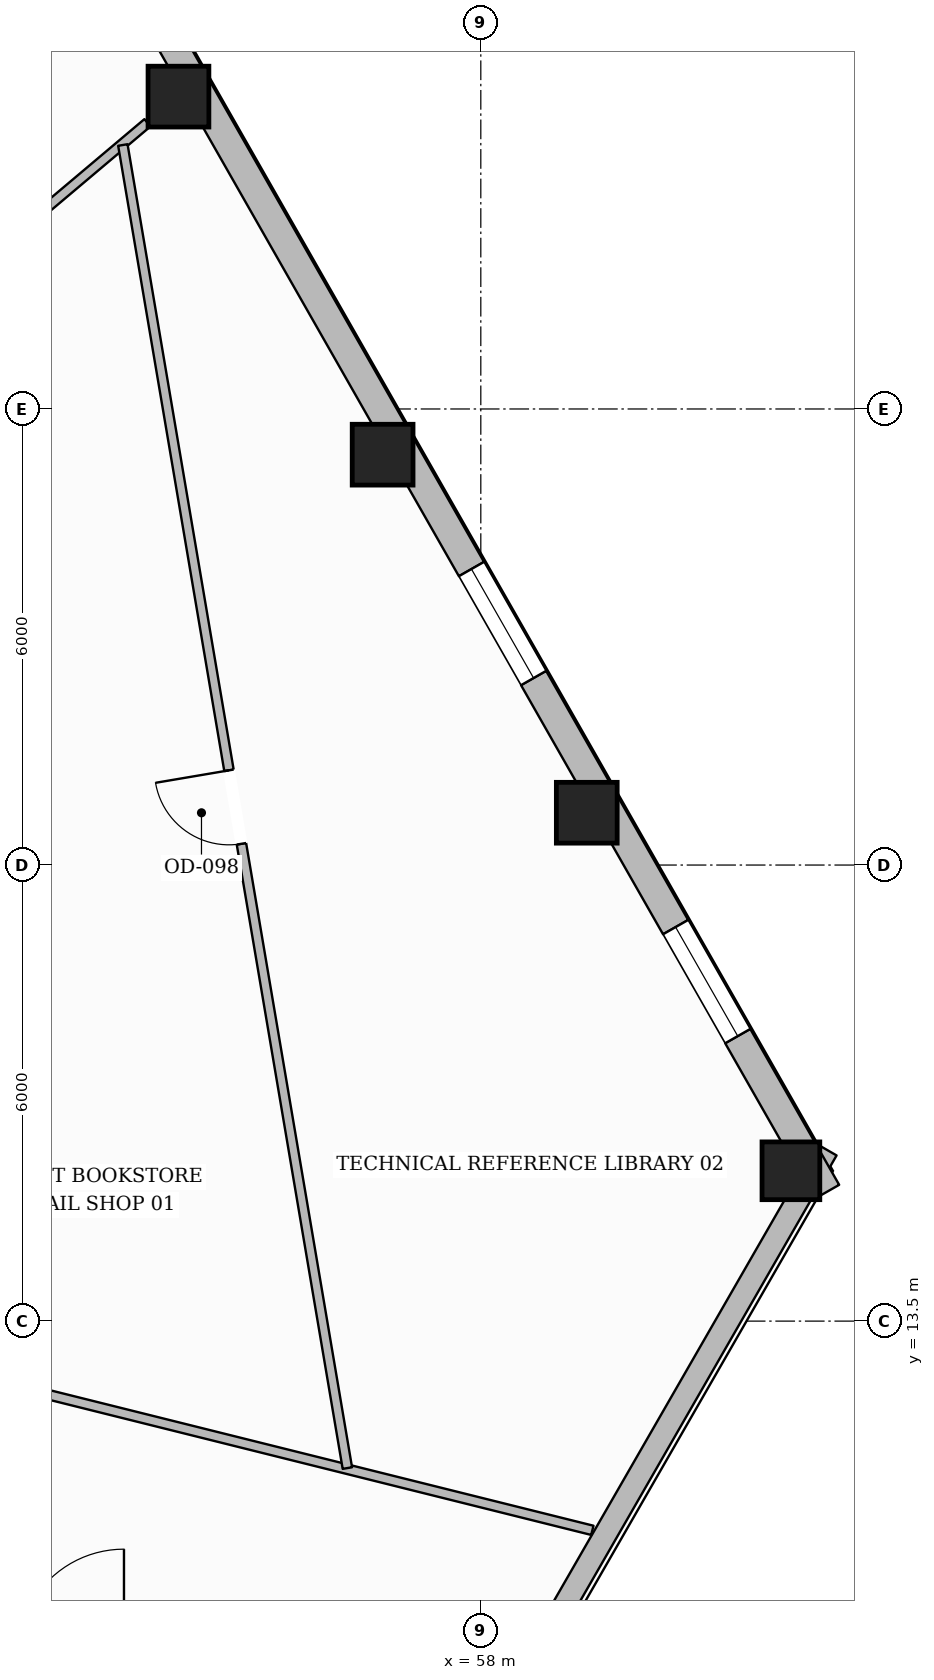
"""IFC4 building model, lengths in metres.
Left out: names, types, materials, properties, quantities, classifications, styles, units other than length and angle.
Written with IfcOpenShell. Run it as: python <this file> out.ifc"""

import sys

from ifc_helpers import new_model, si_unit, direction, frame, frame_2d, origin, origin_2d, place, context, subcontext, project, spatial, rectangle, hollow_rectangle, extrude, element, fill, save


model = new_model("IFC4")
c1 = context("Model", 3, precision=1e-05, world=origin(), true_north=direction((0.0, 1.0)))
c2 = subcontext(c1, "Body", "Model", "MODEL_VIEW")
j1 = project(units=[si_unit("LENGTHUNIT", "METRE"), si_unit("PLANEANGLEUNIT", "RADIAN")], contexts=[c1])
p1 = place(None, origin())
s1 = spatial("IfcSite", under=j1, at=p1, CompositionType="ELEMENT")
p2 = place(p1, origin())
s2 = spatial("IfcBuilding", under=s1, at=p2, CompositionType="ELEMENT")
p3 = place(p2, frame((0.0, 0.0, 13.7)))
s3 = spatial("IfcBuildingStorey", under=s2, at=p3, CompositionType="ELEMENT", Elevation=13.7)
p4 = place(p3, frame((62.08, 15.478, 0.0), z_axis=(0.0, 0.0, 1.0), x_axis=(1.0, 0.0, 0.0)))
e1 = element("IfcColumn", 1, at=p4, inside=s3, PredefinedType="COLUMN", context=c2, shape_type="SweptSolid", body=[
    extrude(hollow_rectangle(XDim=0.76, YDim=0.76, WallThickness=0.035, at=origin_2d()), origin(), (0.0, 0.0, 1.0), 3.59),
])
for number, where, z_axis, x_axis in (
    (2, (59.394, 20.188, 0.0), (0.0, 0.0, 1.0), (1.0, 0.0, 0.0)),
    (3, (56.708, 24.899, 0.0), (0.0, 0.0, 1.0), (1.0, 0.0, 0.0)),
    (4, (54.022, 29.609, 0.0), (0.0, 0.0, 1.0), (1.0, 0.0, 0.0)),
):
    element("IfcColumn", number, at=place(p3, frame(where, z_axis=z_axis, x_axis=x_axis)), inside=s3, PredefinedType="COLUMN", context=c2, shape_type="SweptSolid", body=[
        extrude(hollow_rectangle(XDim=0.8, YDim=0.8, WallThickness=0.036, at=origin_2d()), origin(), (0.0, 0.0, 1.0), 3.59),
    ])
p5 = place(p3, frame((62.551, 15.755, 0.0), z_axis=(0.0, 0.0, 1.0), x_axis=(-0.498758778038, -0.866740838619, 0.0)))
e5 = element("IfcWall", 5, at=p5, inside=s3, PredefinedType="STANDARD", context=c2, shape_type="SweptSolid", body=[
    extrude(rectangle(XDim=17.156, YDim=0.3, at=frame_2d((8.578, 0.0))), origin(), (0.0, 0.0, 1.0), 2.97),
])
p6 = place(p5, frame((7.978, 0.0, 0.65)))
e6 = element("IfcOpeningElement", 6, at=p6, cuts=e5, PredefinedType="OPENING", context=c2, shape_type="SweptSolid", body=[
    extrude(rectangle(XDim=1.2, YDim=1.7, at=frame_2d((0.6, 0.85))), frame((0.0, 0.16, 0.0), z_axis=(0.0, -1.0, 0.0), x_axis=(1.0, 0.0, 0.0)), (0.0, 0.0, 1.0), 0.32),
])
p7 = place(p3, frame((45.962, 44.292, 0.0), z_axis=(0.0, 0.0, 1.0), x_axis=(0.495312811216, -0.868714693697, 0.0)))
e7 = element("IfcWall", 7, at=p7, inside=s3, PredefinedType="STANDARD", context=c2, shape_type="SweptSolid", body=[
    extrude(rectangle(XDim=33.49, YDim=0.38, at=frame_2d((16.745, 0.0))), origin(), (0.0, 0.0, 1.0), 2.97),
])
p8 = place(p7, frame((29.479, 0.0, 0.65)))
e8 = element("IfcOpeningElement", 8, at=p8, cuts=e7, PredefinedType="OPENING", context=c2, shape_type="SweptSolid", body=[
    extrude(rectangle(XDim=1.65, YDim=1.75, at=frame_2d((0.825, 0.875))), frame((0.0, 0.2, 0.0), z_axis=(0.0, -1.0, 0.0), x_axis=(1.0, 0.0, 0.0)), (0.0, 0.0, 1.0), 0.4),
])
p9 = place(p7, frame((24.056, 0.0, 0.65)))
e9 = element("IfcOpeningElement", 9, at=p9, cuts=e7, PredefinedType="OPENING", context=c2, shape_type="SweptSolid", body=[
    extrude(rectangle(XDim=1.65, YDim=1.75, at=frame_2d((0.825, 0.875))), frame((0.0, 0.2, 0.0), z_axis=(0.0, -1.0, 0.0), x_axis=(1.0, 0.0, 0.0)), (0.0, 0.0, 1.0), 0.4),
])
p10 = place(p7, frame((13.211, 0.0, 0.65)))
e10 = element("IfcOpeningElement", 10, at=p10, cuts=e7, PredefinedType="OPENING", context=c2, shape_type="SweptSolid", body=[
    extrude(rectangle(XDim=1.65, YDim=1.75, at=frame_2d((0.825, 0.875))), frame((0.0, 0.2, 0.0), z_axis=(0.0, -1.0, 0.0), x_axis=(1.0, 0.0, 0.0)), (0.0, 0.0, 1.0), 0.4),
])
p11 = place(p7, frame((7.789, 0.0, 0.65)))
e11 = element("IfcOpeningElement", 11, at=p11, cuts=e7, PredefinedType="OPENING", context=c2, shape_type="SweptSolid", body=[
    extrude(rectangle(XDim=1.65, YDim=1.75, at=frame_2d((0.825, 0.875))), frame((0.0, 0.2, 0.0), z_axis=(0.0, -1.0, 0.0), x_axis=(1.0, 0.0, 0.0)), (0.0, 0.0, 1.0), 0.4),
])
p12 = place(p7, frame((2.366, 0.0, 0.65)))
e12 = element("IfcOpeningElement", 12, at=p12, cuts=e7, PredefinedType="OPENING", context=c2, shape_type="SweptSolid", body=[
    extrude(rectangle(XDim=1.65, YDim=1.75, at=frame_2d((0.825, 0.875))), frame((0.0, 0.2, 0.0), z_axis=(0.0, -1.0, 0.0), x_axis=(1.0, 0.0, 0.0)), (0.0, 0.0, 1.0), 0.4),
])
p13 = place(p3, frame((48.77, 25.18, 0.0), z_axis=(0.0, 0.0, 1.0), x_axis=(0.764507431672, 0.644614913664, 0.0)))
e13 = element("IfcWall", 13, at=p13, inside=s3, PredefinedType="PARTITIONING", context=c2, shape_type="SweptSolid", body=[
    extrude(rectangle(XDim=6.337, YDim=0.125, at=frame_2d((3.168, 0.0))), origin(), (0.0, 0.0, 1.0), 3.057),
])
p14 = place(p3, frame((50.101, 13.083, 0.0), z_axis=(0.0, 0.0, 1.0), x_axis=(0.970295533253, -0.241922669771, 0.0)))
e14 = element("IfcWall", 14, at=p14, inside=s3, PredefinedType="PARTITIONING", context=c2, shape_type="SweptSolid", body=[
    extrude(rectangle(XDim=9.654, YDim=0.125, at=frame_2d((4.827, 0.0))), origin(), (0.0, 0.0, 1.0), 3.59),
])
p15 = place(p3, frame((56.244, 11.567, 0.0), z_axis=(0.0, 0.0, 1.0), x_axis=(-0.167295506577, 0.985906797562, 0.0)))
e15 = element("IfcWall", 15, at=p15, inside=s3, PredefinedType="PARTITIONING", context=c2, shape_type="SweptSolid", body=[
    extrude(rectangle(XDim=17.655, YDim=0.125, at=frame_2d((8.828, 0.0))), origin(), (0.0, 0.0, 1.0), 3.278),
])
p16 = place(p15, frame((8.33, 0.0, 0.0)))
e16 = element("IfcOpeningElement", 16, at=p16, cuts=e15, PredefinedType="OPENING", context=c2, shape_type="SweptSolid", body=[
    extrude(rectangle(XDim=0.98, YDim=2.15, at=frame_2d((0.49, 1.075))), frame((0.0, 0.073, 0.0), z_axis=(0.0, -1.0, 0.0), x_axis=(1.0, 0.0, 0.0)), (0.0, 0.0, 1.0), 0.145),
])
p17 = place(p8, origin())
e17 = element("IfcWindow", 17, at=p17, inside=s3, PartitioningType="SINGLE_PANEL", PredefinedType="WINDOW", context=c2, shape_type="SweptSolid", body=[
    extrude(rectangle(XDim=1.65, YDim=1.75, at=frame_2d((0.825, 0.875))), frame((0.0, 0.03, 0.0), z_axis=(0.0, -1.0, 0.0), x_axis=(1.0, 0.0, 0.0)), (0.0, 0.0, 1.0), 0.06),
])
fill(e8, e17)
p18 = place(p9, origin())
e18 = element("IfcWindow", 18, at=p18, inside=s3, PartitioningType="SINGLE_PANEL", PredefinedType="WINDOW", context=c2, shape_type="SweptSolid", body=[
    extrude(rectangle(XDim=1.65, YDim=1.75, at=frame_2d((0.825, 0.875))), frame((0.0, 0.03, 0.0), z_axis=(0.0, -1.0, 0.0), x_axis=(1.0, 0.0, 0.0)), (0.0, 0.0, 1.0), 0.06),
])
fill(e9, e18)
p19 = place(p16, origin())
e19 = element("IfcDoor", 19, at=p19, inside=s3, OperationType="SINGLE_SWING_RIGHT", PredefinedType="DOOR", context=c2, shape_type="SweptSolid", body=[
    extrude(rectangle(XDim=0.98, YDim=2.15, at=frame_2d((0.49, 1.075))), frame((0.0, 0.025, 0.0), z_axis=(0.0, -1.0, 0.0), x_axis=(1.0, 0.0, 0.0)), (0.0, 0.0, 1.0), 0.05),
])
fill(e16, e19)
save(model, sys.argv[1])
